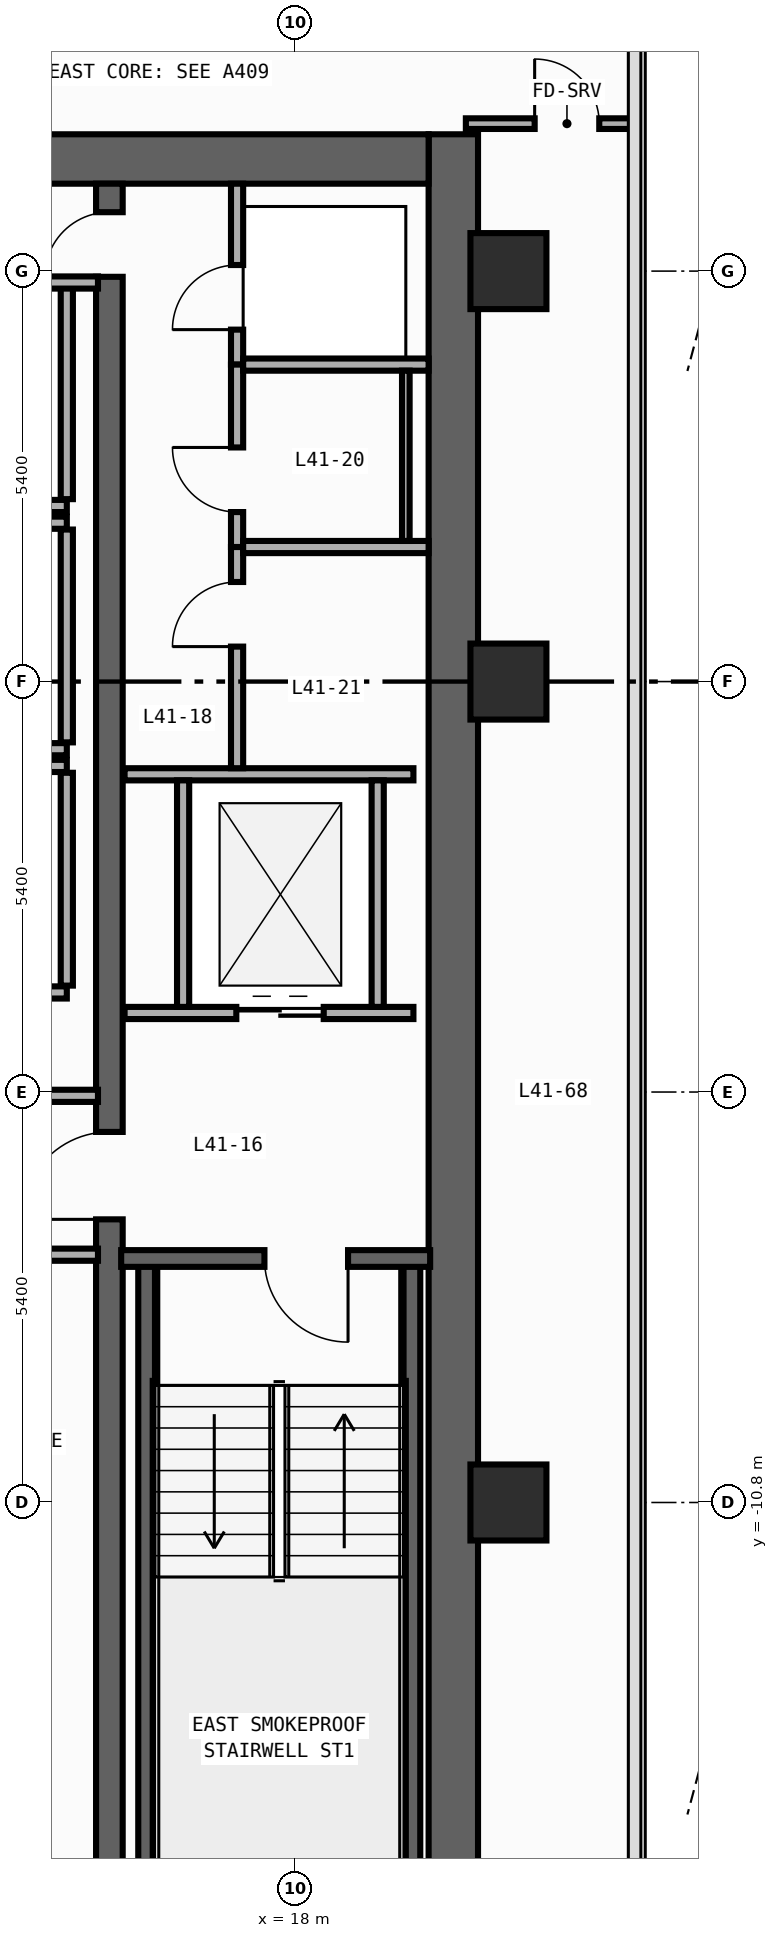
"""IFC4 building model, lengths in metres.
Left out: names, types, materials, properties, quantities, classifications, styles, units other than length and angle.
Written with IfcOpenShell. Run it as: python <this file> out.ifc"""

import sys

from ifc_helpers import new_model, si_unit, direction, frame, frame_2d, origin, origin_2d, place, context, subcontext, project, spatial, rectangle, extrude, element, fill, save


model = new_model("IFC4")
c1 = context("Model", 3, precision=1e-05, world=origin(), true_north=direction((0.0, 1.0)))
c2 = subcontext(c1, "Body", "Model", "MODEL_VIEW")
j1 = project(units=[si_unit("LENGTHUNIT", "METRE"), si_unit("PLANEANGLEUNIT", "RADIAN")], contexts=[c1])
p1 = place(None, origin())
s1 = spatial("IfcSite", under=j1, at=p1, CompositionType="ELEMENT")
p2 = place(p1, origin())
s2 = spatial("IfcBuilding", under=s1, at=p2, CompositionType="ELEMENT")
p3 = place(p2, frame((0.0, 0.0, 180.2)))
s3 = spatial("IfcBuildingStorey", under=s2, at=p3, CompositionType="ELEMENT", Elevation=180.2)
p4 = place(p3, frame((20.075, -19.8, 0.0), z_axis=(0.0, 0.0, 1.0), x_axis=(0.0, 1.0, 0.0)))
e1 = element("IfcWall", 1, at=p4, inside=s3, PredefinedType="SHEAR", context=c2, shape_type="SweptSolid", body=[
    extrude(rectangle(XDim=27.0, YDim=0.65, at=frame_2d((13.5, 0.0))), origin(), (0.0, 0.0, 1.0), 3.54),
])
p5 = place(p3, frame((12.65, 6.875, 0.0), z_axis=(0.0, 0.0, 1.0), x_axis=(1.0, 0.0, 0.0)))
e2 = element("IfcWall", 2, at=p5, inside=s3, PredefinedType="SHEAR", context=c2, shape_type="SweptSolid", body=[
    extrude(rectangle(XDim=7.1, YDim=0.65, at=frame_2d((3.55, 0.0))), origin(), (0.0, 0.0, 1.0), 3.54),
])
p6 = place(p3, frame((15.55, -19.15, 0.0), z_axis=(0.0, 0.0, 1.0), x_axis=(0.0, 1.0, 0.0)))
e3 = element("IfcWall", 3, at=p6, inside=s3, PredefinedType="SHEAR", context=c2, shape_type="SweptSolid", body=[
    extrude(rectangle(XDim=25.7, YDim=0.35, at=frame_2d((12.85, 0.0))), origin(), (0.0, 0.0, 1.0), 3.54),
])
p7 = place(p6, frame((12.075, 0.0, 0.0)))
e4 = element("IfcOpeningElement", 4, at=p7, cuts=e3, PredefinedType="OPENING", context=c2, shape_type="SweptSolid", body=[
    extrude(rectangle(XDim=1.15, YDim=2.2, at=frame_2d((0.575, 1.1))), frame((0.0, 0.185, 0.0), z_axis=(0.0, -1.0, 0.0), x_axis=(1.0, 0.0, 0.0)), (0.0, 0.0, 1.0), 0.37),
])
p8 = place(p6, frame((24.475, 0.0, 0.0)))
e5 = element("IfcOpeningElement", 5, at=p8, cuts=e3, PredefinedType="OPENING", context=c2, shape_type="SweptSolid", body=[
    extrude(rectangle(XDim=0.85, YDim=2.1, at=frame_2d((0.425, 1.05))), frame((0.0, 0.185, 0.0), z_axis=(0.0, -1.0, 0.0), x_axis=(1.0, 0.0, 0.0)), (0.0, 0.0, 1.0), 0.37),
])
for number, where, z_axis, x_axis in (
    (6, (16.04, -19.01, 0.0), (0.0, 0.0, 1.0), (0.0, 1.0, 0.0)),
    (7, (19.53, -19.01, 0.0), (0.0, 0.0, 1.0), (0.0, 1.0, 0.0)),
):
    element("IfcWall", number, at=place(p3, frame(where, z_axis=z_axis, x_axis=x_axis)), inside=s3, PredefinedType="SHEAR", context=c2, shape_type="SweptSolid", body=[
        extrude(rectangle(XDim=11.42, YDim=0.22, at=frame_2d((5.71, 0.0))), origin(), (0.0, 0.0, 1.0), 3.54),
    ])
p9 = place(p3, frame((19.77, -7.59, 0.0), z_axis=(0.0, 0.0, 1.0), x_axis=(-1.0, 0.0, 0.0)))
e8 = element("IfcWall", 8, at=p9, inside=s3, PredefinedType="SHEAR", context=c2, shape_type="SweptSolid", body=[
    extrude(rectangle(XDim=4.065, YDim=0.22, at=frame_2d((2.032, 0.0))), origin(), (0.0, 0.0, 1.0), 3.54),
])
p10 = place(p9, frame((1.08, 0.0, 0.0)))
e9 = element("IfcOpeningElement", 9, at=p10, cuts=e8, PredefinedType="OPENING", context=c2, shape_type="SweptSolid", body=[
    extrude(rectangle(XDim=1.1, YDim=2.2, at=frame_2d((0.55, 1.1))), frame((0.0, 0.12, 0.0), z_axis=(0.0, -1.0, 0.0), x_axis=(1.0, 0.0, 0.0)), (0.0, 0.0, 1.0), 0.24),
])
for number, where, z_axis, x_axis in (
    (10, (20.8, -10.8, 0.0), (0.0, 0.0, 1.0), (1.0, 0.0, 0.0)),
    (11, (20.8, 0.0, 0.0), (0.0, 0.0, 1.0), (1.0, 0.0, 0.0)),
    (12, (20.8, 5.4, 0.0), (0.0, 0.0, 1.0), (1.0, 0.0, 0.0)),
):
    element("IfcColumn", number, at=place(p3, frame(where, z_axis=z_axis, x_axis=x_axis)), inside=s3, PredefinedType="COLUMN", context=c2, shape_type="SweptSolid", body=[
        extrude(rectangle(XDim=1.0, YDim=1.0, at=origin_2d()), origin(), (0.0, 0.0, 1.0), 3.8),
    ])
p11 = place(p3, frame((12.65, 2.31, 0.0), z_axis=(0.0, 0.0, 1.0), x_axis=(1.0, 0.0, 0.0)))
e13 = element("IfcWall", 13, at=p11, inside=s3, PredefinedType="STANDARD", context=c2, shape_type="SweptSolid", body=[
    extrude(rectangle(XDim=2.34, YDim=0.16, at=frame_2d((1.17, 0.0))), origin(), (0.0, 0.0, 1.0), 3.54),
])
p12 = place(p3, frame((14.99, 2.4, 0.0), z_axis=(0.0, 0.0, 1.0), x_axis=(0.0, 1.0, 0.0)))
e14 = element("IfcWall", 14, at=p12, inside=s3, PredefinedType="STANDARD", context=c2, shape_type="SweptSolid", body=[
    extrude(rectangle(XDim=2.8, YDim=0.16, at=frame_2d((1.4, 0.0))), origin(), (0.0, 0.0, 1.0), 3.54),
])
for number, where, z_axis, x_axis in (
    (15, (12.65, -0.89, 0.0), (0.0, 0.0, 1.0), (1.0, 0.0, 0.0)),
    (16, (12.65, 2.09, 0.0), (0.0, 0.0, 1.0), (1.0, 0.0, 0.0)),
):
    element("IfcWall", number, at=place(p3, frame(where, z_axis=z_axis, x_axis=x_axis)), inside=s3, PredefinedType="STANDARD", context=c2, shape_type="SweptSolid", body=[
        extrude(rectangle(XDim=2.34, YDim=0.16, at=frame_2d((1.17, 0.0))), origin(), (0.0, 0.0, 1.0), 3.54),
    ])
p13 = place(p3, frame((14.99, -0.8, 0.0), z_axis=(0.0, 0.0, 1.0), x_axis=(0.0, 1.0, 0.0)))
e17 = element("IfcWall", 17, at=p13, inside=s3, PredefinedType="STANDARD", context=c2, shape_type="SweptSolid", body=[
    extrude(rectangle(XDim=2.8, YDim=0.16, at=frame_2d((1.4, 0.0))), origin(), (0.0, 0.0, 1.0), 3.54),
])
for number, where, z_axis, x_axis in (
    (18, (12.65, -4.09, 0.0), (0.0, 0.0, 1.0), (1.0, 0.0, 0.0)),
    (19, (12.65, -1.11, 0.0), (0.0, 0.0, 1.0), (1.0, 0.0, 0.0)),
):
    element("IfcWall", number, at=place(p3, frame(where, z_axis=z_axis, x_axis=x_axis)), inside=s3, PredefinedType="STANDARD", context=c2, shape_type="SweptSolid", body=[
        extrude(rectangle(XDim=2.34, YDim=0.16, at=frame_2d((1.17, 0.0))), origin(), (0.0, 0.0, 1.0), 3.54),
    ])
p14 = place(p3, frame((14.99, -4.0, 0.0), z_axis=(0.0, 0.0, 1.0), x_axis=(0.0, 1.0, 0.0)))
e20 = element("IfcWall", 20, at=p14, inside=s3, PredefinedType="STANDARD", context=c2, shape_type="SweptSolid", body=[
    extrude(rectangle(XDim=2.8, YDim=0.16, at=frame_2d((1.4, 0.0))), origin(), (0.0, 0.0, 1.0), 3.54),
])
p15 = place(p3, frame((15.75, -4.36, 0.0), z_axis=(0.0, 0.0, 1.0), x_axis=(1.0, 0.0, 0.0)))
e21 = element("IfcWall", 21, at=p15, inside=s3, PredefinedType="STANDARD", context=c2, shape_type="SweptSolid", body=[
    extrude(rectangle(XDim=3.8, YDim=0.16, at=frame_2d((1.9, 0.0))), origin(), (0.0, 0.0, 1.0), 3.54),
])
p16 = place(p15, frame((1.47, 0.0, 0.0)))
e22 = element("IfcOpeningElement", 22, at=p16, cuts=e21, PredefinedType="OPENING", context=c2, shape_type="SweptSolid", body=[
    extrude(rectangle(XDim=1.15, YDim=2.2, at=frame_2d((0.575, 1.1))), frame((0.0, 0.09, 0.0), z_axis=(0.0, -1.0, 0.0), x_axis=(1.0, 0.0, 0.0)), (0.0, 0.0, 1.0), 0.18),
])
p17 = place(p3, frame((15.75, -1.22, 0.0), z_axis=(0.0, 0.0, 1.0), x_axis=(1.0, 0.0, 0.0)))
e23 = element("IfcWall", 23, at=p17, inside=s3, PredefinedType="STANDARD", context=c2, shape_type="SweptSolid", body=[
    extrude(rectangle(XDim=3.8, YDim=0.16, at=frame_2d((1.9, 0.0))), origin(), (0.0, 0.0, 1.0), 3.54),
])
for number, where, z_axis, x_axis in (
    (24, (16.52, -4.28, 0.0), (0.0, 0.0, 1.0), (0.0, 1.0, 0.0)),
    (25, (19.08, -4.28, 0.0), (0.0, 0.0, 1.0), (0.0, 1.0, 0.0)),
):
    element("IfcWall", number, at=place(p3, frame(where, z_axis=z_axis, x_axis=x_axis)), inside=s3, PredefinedType="STANDARD", context=c2, shape_type="SweptSolid", body=[
        extrude(rectangle(XDim=2.98, YDim=0.16, at=frame_2d((1.49, 0.0))), origin(), (0.0, 0.0, 1.0), 3.54),
    ])
for number, where, z_axis, x_axis in (
    (26, (12.8, -5.45, 0.0), (0.0, 0.0, 1.0), (1.0, 0.0, 0.0)),
    (27, (12.8, -7.54, 0.0), (0.0, 0.0, 1.0), (1.0, 0.0, 0.0)),
    (28, (12.8, 5.25, 0.0), (0.0, 0.0, 1.0), (1.0, 0.0, 0.0)),
):
    element("IfcWall", number, at=place(p3, frame(where, z_axis=z_axis, x_axis=x_axis)), inside=s3, PredefinedType="STANDARD", context=c2, shape_type="SweptSolid", body=[
        extrude(rectangle(XDim=2.6, YDim=0.16, at=frame_2d((1.3, 0.0))), origin(), (0.0, 0.0, 1.0), 3.54),
    ])
p18 = place(p3, frame((17.23, 4.17, 0.0), z_axis=(0.0, 0.0, 1.0), x_axis=(0.0, 1.0, 0.0)))
e29 = element("IfcWall", 29, at=p18, inside=s3, PredefinedType="PARTITIONING", context=c2, shape_type="SweptSolid", body=[
    extrude(rectangle(XDim=2.38, YDim=0.16, at=frame_2d((1.19, 0.0))), origin(), (0.0, 0.0, 1.0), 3.54),
])
p19 = place(p18, frame((0.46, 0.0, 0.0)))
e30 = element("IfcOpeningElement", 30, at=p19, cuts=e29, PredefinedType="OPENING", context=c2, shape_type="SweptSolid", body=[
    extrude(rectangle(XDim=0.85, YDim=2.1, at=frame_2d((0.425, 1.05))), frame((0.0, 0.09, 0.0), z_axis=(0.0, -1.0, 0.0), x_axis=(1.0, 0.0, 0.0)), (0.0, 0.0, 1.0), 0.18),
])
p20 = place(p3, frame((17.23, 1.77, 0.0), z_axis=(0.0, 0.0, 1.0), x_axis=(0.0, 1.0, 0.0)))
e31 = element("IfcWall", 31, at=p20, inside=s3, PredefinedType="PARTITIONING", context=c2, shape_type="SweptSolid", body=[
    extrude(rectangle(XDim=2.4, YDim=0.16, at=frame_2d((1.2, 0.0))), origin(), (0.0, 0.0, 1.0), 3.54),
])
p21 = place(p20, frame((0.46, 0.0, 0.0)))
e32 = element("IfcOpeningElement", 32, at=p21, cuts=e31, PredefinedType="OPENING", context=c2, shape_type="SweptSolid", body=[
    extrude(rectangle(XDim=0.85, YDim=2.1, at=frame_2d((0.425, 1.05))), frame((0.0, 0.09, 0.0), z_axis=(0.0, -1.0, 0.0), x_axis=(1.0, 0.0, 0.0)), (0.0, 0.0, 1.0), 0.18),
])
p22 = place(p3, frame((17.23, -1.14, 0.0), z_axis=(0.0, 0.0, 1.0), x_axis=(0.0, 1.0, 0.0)))
e33 = element("IfcWall", 33, at=p22, inside=s3, PredefinedType="PARTITIONING", context=c2, shape_type="SweptSolid", body=[
    extrude(rectangle(XDim=2.91, YDim=0.16, at=frame_2d((1.455, 0.0))), origin(), (0.0, 0.0, 1.0), 3.54),
])
p23 = place(p22, frame((1.6, 0.0, 0.0)))
e34 = element("IfcOpeningElement", 34, at=p23, cuts=e33, PredefinedType="OPENING", context=c2, shape_type="SweptSolid", body=[
    extrude(rectangle(XDim=0.85, YDim=2.1, at=frame_2d((0.425, 1.05))), frame((0.0, 0.09, 0.0), z_axis=(0.0, -1.0, 0.0), x_axis=(1.0, 0.0, 0.0)), (0.0, 0.0, 1.0), 0.18),
])
for number, where, z_axis, x_axis in (
    (35, (17.31, 4.17, 0.0), (0.0, 0.0, 1.0), (1.0, 0.0, 0.0)),
    (36, (17.31, 1.77, 0.0), (0.0, 0.0, 1.0), (1.0, 0.0, 0.0)),
):
    element("IfcWall", number, at=place(p3, frame(where, z_axis=z_axis, x_axis=x_axis)), inside=s3, PredefinedType="PARTITIONING", context=c2, shape_type="SweptSolid", body=[
        extrude(rectangle(XDim=2.44, YDim=0.16, at=frame_2d((1.22, 0.0))), origin(), (0.0, 0.0, 1.0), 3.54),
    ])
p24 = place(p3, frame((20.24, 7.34, 0.0), z_axis=(0.0, 0.0, 1.0), x_axis=(1.0, 0.0, 0.0)))
e37 = element("IfcWall", 37, at=p24, inside=s3, PredefinedType="PARTITIONING", context=c2, shape_type="SweptSolid", body=[
    extrude(rectangle(XDim=2.215, YDim=0.14, at=frame_2d((1.107, 0.0))), origin(), (0.0, 0.0, 1.0), 3.54),
])
p25 = place(p24, frame((0.905, 0.0, 0.0)))
e38 = element("IfcOpeningElement", 38, at=p25, cuts=e37, PredefinedType="OPENING", context=c2, shape_type="SweptSolid", body=[
    extrude(rectangle(XDim=0.85, YDim=2.1, at=frame_2d((0.425, 1.05))), frame((0.0, 0.08, 0.0), z_axis=(0.0, -1.0, 0.0), x_axis=(1.0, 0.0, 0.0)), (0.0, 0.0, 1.0), 0.16),
])
p26 = place(p3, frame((19.45, 4.09, 0.0), z_axis=(0.0, 0.0, 1.0), x_axis=(0.0, -1.0, 0.0)))
e39 = element("IfcWall", 39, at=p26, inside=s3, PredefinedType="PARTITIONING", context=c2, shape_type="SweptSolid", body=[
    extrude(rectangle(XDim=2.24, YDim=0.1, at=frame_2d((1.12, 0.0))), origin(), (0.0, 0.0, 1.0), 3.54),
])
p27 = place(p10, origin())
e40 = element("IfcDoor", 40, at=p27, inside=s3, OperationType="SINGLE_SWING_LEFT", PredefinedType="DOOR", context=c2, shape_type="SweptSolid", body=[
    extrude(rectangle(XDim=1.1, YDim=2.2, at=frame_2d((0.55, 1.1))), frame((0.0, 0.025, 0.0), z_axis=(0.0, -1.0, 0.0), x_axis=(1.0, 0.0, 0.0)), (0.0, 0.0, 1.0), 0.05),
])
fill(e9, e40)
p28 = place(p7, origin())
e41 = element("IfcDoor", 41, at=p28, inside=s3, OperationType="SINGLE_SWING_LEFT", PredefinedType="DOOR", context=c2, shape_type="SweptSolid", body=[
    extrude(rectangle(XDim=1.15, YDim=2.2, at=frame_2d((0.575, 1.1))), frame((0.0, 0.025, 0.0), z_axis=(0.0, -1.0, 0.0), x_axis=(1.0, 0.0, 0.0)), (0.0, 0.0, 1.0), 0.05),
])
fill(e4, e41)
p29 = place(p8, origin())
e42 = element("IfcDoor", 42, at=p29, inside=s3, OperationType="SINGLE_SWING_LEFT", PredefinedType="DOOR", context=c2, shape_type="SweptSolid", body=[
    extrude(rectangle(XDim=0.85, YDim=2.1, at=frame_2d((0.425, 1.05))), frame((0.0, 0.025, 0.0), z_axis=(0.0, -1.0, 0.0), x_axis=(1.0, 0.0, 0.0)), (0.0, 0.0, 1.0), 0.05),
])
fill(e5, e42)
p30 = place(p16, origin())
e43 = element("IfcDoor", 43, at=p30, inside=s3, OperationType="DOUBLE_DOOR_SLIDING", PredefinedType="DOOR", context=c2, shape_type="SweptSolid", body=[
    extrude(rectangle(XDim=1.15, YDim=2.2, at=frame_2d((0.575, 1.1))), frame((0.0, 0.025, 0.0), z_axis=(0.0, -1.0, 0.0), x_axis=(1.0, 0.0, 0.0)), (0.0, 0.0, 1.0), 0.05),
])
fill(e22, e43)
p31 = place(p19, origin())
e44 = element("IfcDoor", 44, at=p31, inside=s3, OperationType="SINGLE_SWING_LEFT", PredefinedType="DOOR", context=c2, shape_type="SweptSolid", body=[
    extrude(rectangle(XDim=0.85, YDim=2.1, at=frame_2d((0.425, 1.05))), frame((0.0, 0.025, 0.0), z_axis=(0.0, -1.0, 0.0), x_axis=(1.0, 0.0, 0.0)), (0.0, 0.0, 1.0), 0.05),
])
fill(e30, e44)
p32 = place(p21, origin())
e45 = element("IfcDoor", 45, at=p32, inside=s3, OperationType="SINGLE_SWING_RIGHT", PredefinedType="DOOR", context=c2, shape_type="SweptSolid", body=[
    extrude(rectangle(XDim=0.85, YDim=2.1, at=frame_2d((0.425, 1.05))), frame((0.0, 0.025, 0.0), z_axis=(0.0, -1.0, 0.0), x_axis=(1.0, 0.0, 0.0)), (0.0, 0.0, 1.0), 0.05),
])
fill(e32, e45)
p33 = place(p23, origin())
e46 = element("IfcDoor", 46, at=p33, inside=s3, OperationType="SINGLE_SWING_LEFT", PredefinedType="DOOR", context=c2, shape_type="SweptSolid", body=[
    extrude(rectangle(XDim=0.85, YDim=2.1, at=frame_2d((0.425, 1.05))), frame((0.0, 0.025, 0.0), z_axis=(0.0, -1.0, 0.0), x_axis=(1.0, 0.0, 0.0)), (0.0, 0.0, 1.0), 0.05),
])
fill(e34, e46)
p34 = place(p25, origin())
e47 = element("IfcDoor", 47, at=p34, inside=s3, OperationType="SINGLE_SWING_LEFT", PredefinedType="DOOR", context=c2, shape_type="SweptSolid", body=[
    extrude(rectangle(XDim=0.85, YDim=2.1, at=frame_2d((0.425, 1.05))), frame((0.0, 0.025, 0.0), z_axis=(0.0, -1.0, 0.0), x_axis=(1.0, 0.0, 0.0)), (0.0, 0.0, 1.0), 0.05),
])
fill(e38, e47)
save(model, sys.argv[1])
